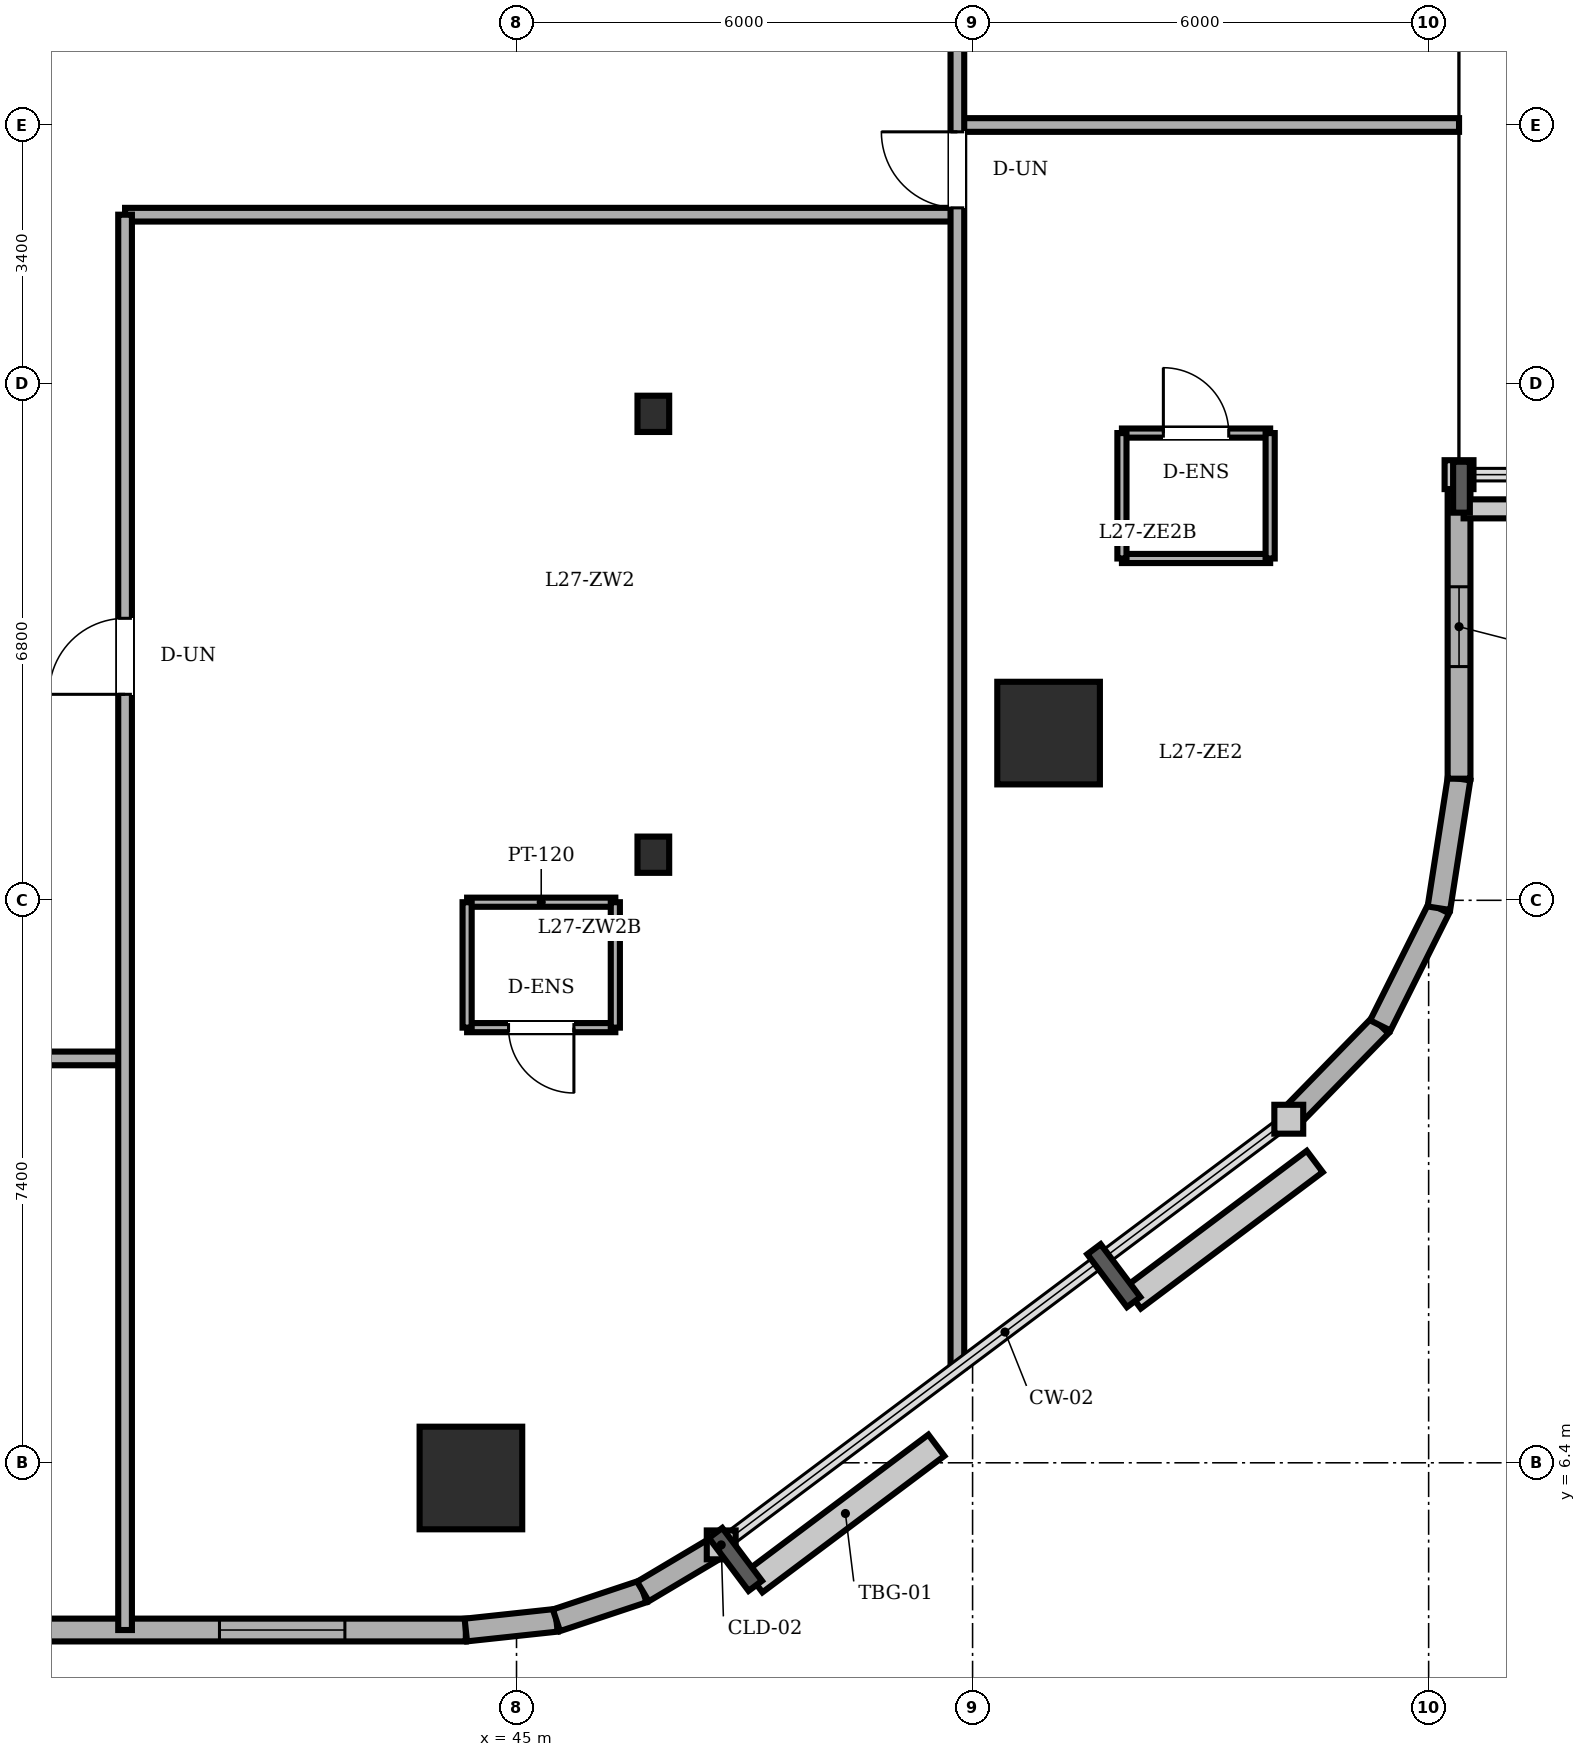
"""IFC4 building model, lengths in metres.
Left out: names, types, materials, properties, quantities, classifications, styles, units other than length and angle.
Written with IfcOpenShell. Run it as: python <this file> out.ifc"""

import sys

from ifc_helpers import new_model, si_unit, direction, frame, frame_2d, origin, origin_2d, place, context, subcontext, project, spatial, rectangle, circle, i_section, extrude, element, fill, save


model = new_model("IFC4")
c1 = context("Model", 3, precision=1e-05, world=origin(), true_north=direction((0.0, 1.0)))
c2 = subcontext(c1, "Body", "Model", "MODEL_VIEW")
j1 = project(units=[si_unit("LENGTHUNIT", "METRE"), si_unit("PLANEANGLEUNIT", "RADIAN")], contexts=[c1])
p1 = place(None, origin())
s1 = spatial("IfcSite", under=j1, at=p1, CompositionType="ELEMENT")
p2 = place(p1, origin())
s2 = spatial("IfcBuilding", under=s1, at=p2, CompositionType="ELEMENT")
p3 = place(p2, frame((0.0, 0.0, 104.3)))
s3 = spatial("IfcBuildingStorey", under=s2, at=p3, CompositionType="ELEMENT", Elevation=104.3)
for number, where, z_axis, x_axis in (
    (1, (44.4, 6.2, 0.0), (0.0, 0.0, 1.0), (1.0, 0.0, 0.0)),
    (2, (52.0, 16.0, 0.0), (0.0, 0.0, 1.0), (1.0, 0.0, 0.0)),
):
    element("IfcColumn", number, at=place(p3, frame(where, z_axis=z_axis, x_axis=x_axis)), inside=s3, PredefinedType="COLUMN", context=c2, shape_type="SweptSolid", body=[
        extrude(circle(Radius=0.675, at=origin_2d()), origin(), (0.0, 0.0, 1.0), 3.6),
    ])
for number, where, z_axis, x_axis in (
    (3, (46.8, 14.4, 0.0), (0.0, 0.0, 1.0), (1.0, 0.0, 0.0)),
    (4, (46.8, 20.2, 0.0), (0.0, 0.0, 1.0), (1.0, 0.0, 0.0)),
):
    element("IfcColumn", number, at=place(p3, frame(where, z_axis=z_axis, x_axis=x_axis)), inside=s3, PredefinedType="COLUMN", context=c2, shape_type="SweptSolid", body=[
        extrude(i_section(OverallWidth=0.417, OverallDepth=0.477, WebThickness=0.036, FlangeThickness=0.057, FilletRadius=0.015, at=origin_2d()), origin(), (0.0, 0.0, 1.0), 3.6),
    ])
p4 = place(p3, frame((14.4, 4.2, 0.0), z_axis=(0.0, 0.0, 1.0), x_axis=(1.0, 0.0, 0.0)))
e5 = element("IfcWall", 5, at=p4, inside=s3, PredefinedType="SOLIDWALL", context=c2, shape_type="SweptSolid", body=[
    extrude(rectangle(XDim=29.933, YDim=0.3, at=frame_2d((14.967, 0.0))), origin(), (0.0, 0.0, 1.0), 3.4),
])
p5 = place(p4, frame((13.525, 0.0, 0.0)))
e6 = element("IfcOpeningElement", 6, at=p5, cuts=e5, PredefinedType="OPENING", context=c2, shape_type="SweptSolid", body=[
    extrude(rectangle(XDim=0.95, YDim=2.2, at=frame_2d((0.475, 1.1))), frame((0.0, 0.16, 0.0), z_axis=(0.0, -1.0, 0.0), x_axis=(1.0, 0.0, 0.0)), (0.0, 0.0, 1.0), 0.32),
])
p6 = place(p4, frame((2.342, 0.0, 0.85)))
e7 = element("IfcOpeningElement", 7, at=p6, cuts=e5, PredefinedType="OPENING", context=c2, shape_type="SweptSolid", body=[
    extrude(rectangle(XDim=1.65, YDim=1.55, at=frame_2d((0.825, 0.775))), frame((0.0, 0.16, 0.0), z_axis=(0.0, -1.0, 0.0), x_axis=(1.0, 0.0, 0.0)), (0.0, 0.0, 1.0), 0.32),
])
p7 = place(p4, frame((5.158, 0.0, 0.85)))
e8 = element("IfcOpeningElement", 8, at=p7, cuts=e5, PredefinedType="OPENING", context=c2, shape_type="SweptSolid", body=[
    extrude(rectangle(XDim=1.65, YDim=1.55, at=frame_2d((0.825, 0.775))), frame((0.0, 0.16, 0.0), z_axis=(0.0, -1.0, 0.0), x_axis=(1.0, 0.0, 0.0)), (0.0, 0.0, 1.0), 0.32),
])
p8 = place(p4, frame((9.875, 0.0, 0.85)))
e9 = element("IfcOpeningElement", 9, at=p8, cuts=e5, PredefinedType="OPENING", context=c2, shape_type="SweptSolid", body=[
    extrude(rectangle(XDim=1.65, YDim=1.55, at=frame_2d((0.825, 0.775))), frame((0.0, 0.16, 0.0), z_axis=(0.0, -1.0, 0.0), x_axis=(1.0, 0.0, 0.0)), (0.0, 0.0, 1.0), 0.32),
])
p9 = place(p4, frame((16.058, 0.0, 0.85)))
e10 = element("IfcOpeningElement", 10, at=p9, cuts=e5, PredefinedType="OPENING", context=c2, shape_type="SweptSolid", body=[
    extrude(rectangle(XDim=1.65, YDim=1.55, at=frame_2d((0.825, 0.775))), frame((0.0, 0.16, 0.0), z_axis=(0.0, -1.0, 0.0), x_axis=(1.0, 0.0, 0.0)), (0.0, 0.0, 1.0), 0.32),
])
p10 = place(p4, frame((20.342, 0.0, 0.85)))
e11 = element("IfcOpeningElement", 11, at=p10, cuts=e5, PredefinedType="OPENING", context=c2, shape_type="SweptSolid", body=[
    extrude(rectangle(XDim=1.65, YDim=1.55, at=frame_2d((0.825, 0.775))), frame((0.0, 0.16, 0.0), z_axis=(0.0, -1.0, 0.0), x_axis=(1.0, 0.0, 0.0)), (0.0, 0.0, 1.0), 0.32),
])
p11 = place(p4, frame((26.692, 0.0, 0.85)))
e12 = element("IfcOpeningElement", 12, at=p11, cuts=e5, PredefinedType="OPENING", context=c2, shape_type="SweptSolid", body=[
    extrude(rectangle(XDim=1.65, YDim=1.55, at=frame_2d((0.825, 0.775))), frame((0.0, 0.16, 0.0), z_axis=(0.0, -1.0, 0.0), x_axis=(1.0, 0.0, 0.0)), (0.0, 0.0, 1.0), 0.32),
])
p12 = place(p3, frame((44.333, 4.2, 0.0), z_axis=(0.0, 0.0, 1.0), x_axis=(0.994289103787, 0.106720092254, 0.0)))
e13 = element("IfcWall", 13, at=p12, inside=s3, PredefinedType="SOLIDWALL", context=c2, shape_type="SweptSolid", body=[
    extrude(rectangle(XDim=1.199, YDim=0.3, at=frame_2d((0.599, 0.0))), origin(), (0.0, 0.0, 1.0), 3.4),
])
p13 = place(p3, frame((45.525, 4.328, 0.0), z_axis=(0.0, 0.0, 1.0), x_axis=(0.948744332129, 0.316044604847, 0.0)))
e14 = element("IfcWall", 14, at=p13, inside=s3, PredefinedType="SOLIDWALL", context=c2, shape_type="SweptSolid", body=[
    extrude(rectangle(XDim=1.2, YDim=0.3, at=frame_2d((0.6, 0.0))), origin(), (0.0, 0.0, 1.0), 3.4),
])
p14 = place(p3, frame((46.663, 4.707, 0.0), z_axis=(0.0, 0.0, 1.0), x_axis=(0.859320591642, 0.511437308749, 0.0)))
e15 = element("IfcWall", 15, at=p14, inside=s3, PredefinedType="SOLIDWALL", context=c2, shape_type="SweptSolid", body=[
    extrude(rectangle(XDim=1.199, YDim=0.3, at=frame_2d((0.599, 0.0))), origin(), (0.0, 0.0, 1.0), 3.4),
])
for number, where, z_axis, x_axis in (
    (16, (55.16, 10.92, 0.0), (0.0, 0.0, 1.0), (0.698, 0.716, 0.0)),
    (17, (56.364, 12.154, 0.0), (0.0, 0.0, 1.0), (0.447, 0.894, 0.0)),
):
    element("IfcWall", number, at=place(p3, frame(where, z_axis=z_axis, x_axis=x_axis)), inside=s3, PredefinedType="SOLIDWALL", context=c2, shape_type="SweptSolid", body=[
        extrude(rectangle(XDim=1.724, YDim=0.3, at=frame_2d((0.862, 0.0))), origin(), (0.0, 0.0, 1.0), 3.4),
    ])
p15 = place(p3, frame((57.135, 13.696, 0.0), z_axis=(0.0, 0.0, 1.0), x_axis=(0.153620989032, 0.988129845581, 0.0)))
e18 = element("IfcWall", 18, at=p15, inside=s3, PredefinedType="SOLIDWALL", context=c2, shape_type="SweptSolid", body=[
    extrude(rectangle(XDim=1.724, YDim=0.3, at=frame_2d((0.862, 0.0))), origin(), (0.0, 0.0, 1.0), 3.4),
])
p16 = place(p3, frame((57.4, 15.4, 0.0), z_axis=(0.0, 0.0, 1.0), x_axis=(0.0, 1.0, 0.0)))
e19 = element("IfcWall", 19, at=p16, inside=s3, PredefinedType="SOLIDWALL", context=c2, shape_type="SweptSolid", body=[
    extrude(rectangle(XDim=4.0, YDim=0.3, at=frame_2d((2.0, 0.0))), origin(), (0.0, 0.0, 1.0), 3.4),
])
p17 = place(p16, frame((1.475, 0.0, 0.85)))
e20 = element("IfcOpeningElement", 20, at=p17, cuts=e19, PredefinedType="OPENING", context=c2, shape_type="SweptSolid", body=[
    extrude(rectangle(XDim=1.05, YDim=1.55, at=frame_2d((0.525, 0.775))), frame((0.0, 0.16, 0.0), z_axis=(0.0, -1.0, 0.0), x_axis=(1.0, 0.0, 0.0)), (0.0, 0.0, 1.0), 0.32),
])
p18 = place(p3, frame((44.35, 13.775, 0.0), z_axis=(0.0, 0.0, 1.0), x_axis=(1.0, 0.0, 0.0)))
e21 = element("IfcWall", 21, at=p18, inside=s3, PredefinedType="PARTITIONING", context=c2, shape_type="SweptSolid", body=[
    extrude(rectangle(XDim=1.95, YDim=0.12, at=frame_2d((0.975, 0.0))), origin(), (0.0, 0.0, 1.0), 3.4),
])
p19 = place(p3, frame((46.3, 12.125, 0.0), z_axis=(0.0, 0.0, 1.0), x_axis=(-1.0, 0.0, 0.0)))
e22 = element("IfcWall", 22, at=p19, inside=s3, PredefinedType="PARTITIONING", context=c2, shape_type="SweptSolid", body=[
    extrude(rectangle(XDim=1.95, YDim=0.12, at=frame_2d((0.975, 0.0))), origin(), (0.0, 0.0, 1.0), 3.4),
])
p20 = place(p19, frame((0.545, 0.0, 0.0)))
e23 = element("IfcOpeningElement", 23, at=p20, cuts=e22, PredefinedType="OPENING", context=c2, shape_type="SweptSolid", body=[
    extrude(rectangle(XDim=0.86, YDim=2.1, at=frame_2d((0.43, 1.05))), frame((0.0, 0.07, 0.0), z_axis=(0.0, -1.0, 0.0), x_axis=(1.0, 0.0, 0.0)), (0.0, 0.0, 1.0), 0.14),
])
p21 = place(p3, frame((44.35, 13.775, 0.0), z_axis=(0.0, 0.0, 1.0), x_axis=(0.0, -1.0, 0.0)))
e24 = element("IfcWall", 24, at=p21, inside=s3, PredefinedType="PARTITIONING", context=c2, shape_type="SweptSolid", body=[
    extrude(rectangle(XDim=1.65, YDim=0.12, at=frame_2d((0.825, 0.0))), origin(), (0.0, 0.0, 1.0), 3.4),
])
p22 = place(p3, frame((46.3, 12.125, 0.0), z_axis=(0.0, 0.0, 1.0), x_axis=(0.0, 1.0, 0.0)))
e25 = element("IfcWall", 25, at=p22, inside=s3, PredefinedType="PARTITIONING", context=c2, shape_type="SweptSolid", body=[
    extrude(rectangle(XDim=1.65, YDim=0.12, at=frame_2d((0.825, 0.0))), origin(), (0.0, 0.0, 1.0), 2.882),
])
p23 = place(p3, frame((52.965, 19.947, 0.0), z_axis=(0.0, 0.0, 1.0), x_axis=(1.0, 0.0, 0.0)))
e26 = element("IfcWall", 26, at=p23, inside=s3, PredefinedType="PARTITIONING", context=c2, shape_type="SweptSolid", body=[
    extrude(rectangle(XDim=1.95, YDim=0.12, at=frame_2d((0.975, 0.0))), origin(), (0.0, 0.0, 1.0), 3.4),
])
p24 = place(p23, frame((0.545, 0.0, 0.0)))
e27 = element("IfcOpeningElement", 27, at=p24, cuts=e26, PredefinedType="OPENING", context=c2, shape_type="SweptSolid", body=[
    extrude(rectangle(XDim=0.86, YDim=2.1, at=frame_2d((0.43, 1.05))), frame((0.0, 0.07, 0.0), z_axis=(0.0, -1.0, 0.0), x_axis=(1.0, 0.0, 0.0)), (0.0, 0.0, 1.0), 0.14),
])
p25 = place(p3, frame((54.915, 18.297, 0.0), z_axis=(0.0, 0.0, 1.0), x_axis=(-1.0, 0.0, 0.0)))
e28 = element("IfcWall", 28, at=p25, inside=s3, PredefinedType="PARTITIONING", context=c2, shape_type="SweptSolid", body=[
    extrude(rectangle(XDim=1.95, YDim=0.12, at=frame_2d((0.975, 0.0))), origin(), (0.0, 0.0, 1.0), 3.4),
])
for number, where, z_axis, x_axis in (
    (29, (52.965, 19.947, 0.0), (0.0, 0.0, 1.0), (0.0, -1.0, 0.0)),
    (30, (54.915, 18.297, 0.0), (0.0, 0.0, 1.0), (0.0, 1.0, 0.0)),
):
    element("IfcWall", number, at=place(p3, frame(where, z_axis=z_axis, x_axis=x_axis)), inside=s3, PredefinedType="PARTITIONING", context=c2, shape_type="SweptSolid", body=[
        extrude(rectangle(XDim=1.65, YDim=0.12, at=frame_2d((0.825, 0.0))), origin(), (0.0, 0.0, 1.0), 3.4),
    ])
p26 = place(p3, frame((8.8, 11.72, 0.0), z_axis=(0.0, 0.0, 1.0), x_axis=(1.0, 0.0, 0.0)))
e31 = element("IfcWall", 31, at=p26, inside=s3, PredefinedType="PARTITIONING", context=c2, shape_type="SweptSolid", body=[
    extrude(rectangle(XDim=31.05, YDim=0.18, at=frame_2d((15.525, 0.0))), origin(), (0.0, 0.0, 1.0), 3.4),
])
p27 = place(p26, frame((15.84, 0.0, 0.0)))
e32 = element("IfcOpeningElement", 32, at=p27, cuts=e31, PredefinedType="OPENING", context=c2, shape_type="SweptSolid", body=[
    extrude(rectangle(XDim=0.92, YDim=2.1, at=frame_2d((0.46, 1.05))), frame((0.0, 0.1, 0.0), z_axis=(0.0, -1.0, 0.0), x_axis=(1.0, 0.0, 0.0)), (0.0, 0.0, 1.0), 0.2),
])
p28 = place(p26, frame((7.34, 0.0, 0.0)))
e33 = element("IfcOpeningElement", 33, at=p28, cuts=e31, PredefinedType="OPENING", context=c2, shape_type="SweptSolid", body=[
    extrude(rectangle(XDim=0.92, YDim=2.1, at=frame_2d((0.46, 1.05))), frame((0.0, 0.1, 0.0), z_axis=(0.0, -1.0, 0.0), x_axis=(1.0, 0.0, 0.0)), (0.0, 0.0, 1.0), 0.2),
])
p29 = place(p26, frame((23.905, 0.0, 0.0)))
e34 = element("IfcOpeningElement", 34, at=p29, cuts=e31, PredefinedType="OPENING", context=c2, shape_type="SweptSolid", body=[
    extrude(rectangle(XDim=0.92, YDim=2.1, at=frame_2d((0.46, 1.05))), frame((0.0, 0.1, 0.0), z_axis=(0.0, -1.0, 0.0), x_axis=(1.0, 0.0, 0.0)), (0.0, 0.0, 1.0), 0.2),
])
p30 = place(p3, frame((39.85, 22.82, 0.0), z_axis=(0.0, 0.0, 1.0), x_axis=(1.0, 0.0, 0.0)))
e35 = element("IfcWall", 35, at=p30, inside=s3, PredefinedType="PARTITIONING", context=c2, shape_type="SweptSolid", body=[
    extrude(rectangle(XDim=10.95, YDim=0.18, at=frame_2d((5.475, 0.0))), origin(), (0.0, 0.0, 1.0), 3.4),
])
p31 = place(p3, frame((50.8, 24.0, 0.0), z_axis=(0.0, 0.0, 1.0), x_axis=(1.0, 0.0, 0.0)))
e36 = element("IfcWall", 36, at=p31, inside=s3, PredefinedType="PARTITIONING", context=c2, shape_type="SweptSolid", body=[
    extrude(rectangle(XDim=6.6, YDim=0.18, at=frame_2d((3.3, 0.0))), origin(), (0.0, 0.0, 1.0), 3.022),
])
p32 = place(p3, frame((39.85, 4.2, 0.0), z_axis=(0.0, 0.0, 1.0), x_axis=(0.0, 1.0, 0.0)))
e37 = element("IfcWall", 37, at=p32, inside=s3, PredefinedType="PARTITIONING", context=c2, shape_type="SweptSolid", body=[
    extrude(rectangle(XDim=18.62, YDim=0.18, at=frame_2d((9.31, 0.0))), origin(), (0.0, 0.0, 1.0), 3.4),
])
p33 = place(p32, frame((12.31, 0.0, 0.0)))
e38 = element("IfcOpeningElement", 38, at=p33, cuts=e37, PredefinedType="OPENING", context=c2, shape_type="SweptSolid", body=[
    extrude(rectangle(XDim=1.0, YDim=2.15, at=frame_2d((0.5, 1.075))), frame((0.0, 0.1, 0.0), z_axis=(0.0, -1.0, 0.0), x_axis=(1.0, 0.0, 0.0)), (0.0, 0.0, 1.0), 0.2),
])
p34 = place(p3, frame((50.8, 7.65, 0.0), z_axis=(0.0, 0.0, 1.0), x_axis=(0.0, 1.0, 0.0)))
e39 = element("IfcWall", 39, at=p34, inside=s3, PredefinedType="PARTITIONING", context=c2, shape_type="SweptSolid", body=[
    extrude(rectangle(XDim=22.7, YDim=0.18, at=frame_2d((11.35, 0.0))), origin(), (0.0, 0.0, 1.0), 3.4),
])
p35 = place(p34, frame((18.765, 0.0, 0.0)))
e40 = element("IfcOpeningElement", 40, at=p35, cuts=e39, PredefinedType="OPENING", context=c2, shape_type="SweptSolid", body=[
    extrude(rectangle(XDim=1.0, YDim=2.15, at=frame_2d((0.5, 1.075))), frame((0.0, 0.1, 0.0), z_axis=(0.0, -1.0, 0.0), x_axis=(1.0, 0.0, 0.0)), (0.0, 0.0, 1.0), 0.2),
])
p36 = place(p34, frame((15.26, 0.0, 0.0)))
e41 = element("IfcOpeningElement", 41, at=p36, cuts=e39, PredefinedType="OPENING", context=c2, shape_type="SweptSolid", body=[
    extrude(rectangle(XDim=1.0, YDim=2.15, at=frame_2d((0.5, 1.075))), frame((0.0, 0.1, 0.0), z_axis=(0.0, -1.0, 0.0), x_axis=(1.0, 0.0, 0.0)), (0.0, 0.0, 1.0), 0.2),
])
p37 = place(p11, origin())
e42 = element("IfcWindow", 42, at=p37, inside=s3, PartitioningType="DOUBLE_PANEL_VERTICAL", PredefinedType="WINDOW", context=c2, shape_type="SweptSolid", body=[
    extrude(rectangle(XDim=1.65, YDim=1.55, at=frame_2d((0.825, 0.775))), frame((0.0, 0.03, 0.0), z_axis=(0.0, -1.0, 0.0), x_axis=(1.0, 0.0, 0.0)), (0.0, 0.0, 1.0), 0.06),
])
fill(e12, e42)
p38 = place(p17, origin())
e43 = element("IfcWindow", 43, at=p38, inside=s3, PartitioningType="SINGLE_PANEL", PredefinedType="WINDOW", context=c2, shape_type="SweptSolid", body=[
    extrude(rectangle(XDim=1.05, YDim=1.55, at=frame_2d((0.525, 0.775))), frame((0.0, 0.03, 0.0), z_axis=(0.0, -1.0, 0.0), x_axis=(1.0, 0.0, 0.0)), (0.0, 0.0, 1.0), 0.06),
])
fill(e20, e43)
p39 = place(p20, origin())
e44 = element("IfcDoor", 44, at=p39, inside=s3, OperationType="SINGLE_SWING_LEFT", PredefinedType="DOOR", context=c2, shape_type="SweptSolid", body=[
    extrude(rectangle(XDim=0.86, YDim=2.1, at=frame_2d((0.43, 1.05))), frame((0.0, 0.025, 0.0), z_axis=(0.0, -1.0, 0.0), x_axis=(1.0, 0.0, 0.0)), (0.0, 0.0, 1.0), 0.05),
])
fill(e23, e44)
p40 = place(p24, origin())
e45 = element("IfcDoor", 45, at=p40, inside=s3, OperationType="SINGLE_SWING_LEFT", PredefinedType="DOOR", context=c2, shape_type="SweptSolid", body=[
    extrude(rectangle(XDim=0.86, YDim=2.1, at=frame_2d((0.43, 1.05))), frame((0.0, 0.025, 0.0), z_axis=(0.0, -1.0, 0.0), x_axis=(1.0, 0.0, 0.0)), (0.0, 0.0, 1.0), 0.05),
])
fill(e27, e45)
p41 = place(p33, origin())
e46 = element("IfcDoor", 46, at=p41, inside=s3, OperationType="SINGLE_SWING_LEFT", PredefinedType="DOOR", context=c2, shape_type="SweptSolid", body=[
    extrude(rectangle(XDim=1.0, YDim=2.15, at=frame_2d((0.5, 1.075))), frame((0.0, 0.025, 0.0), z_axis=(0.0, -1.0, 0.0), x_axis=(1.0, 0.0, 0.0)), (0.0, 0.0, 1.0), 0.05),
])
fill(e38, e46)
p42 = place(p36, origin())
e47 = element("IfcDoor", 47, at=p42, inside=s3, OperationType="SINGLE_SWING_RIGHT", PredefinedType="DOOR", context=c2, shape_type="SweptSolid", body=[
    extrude(rectangle(XDim=1.0, YDim=2.15, at=frame_2d((0.5, 1.075))), frame((0.0, 0.025, 0.0), z_axis=(0.0, -1.0, 0.0), x_axis=(1.0, 0.0, 0.0)), (0.0, 0.0, 1.0), 0.05),
])
fill(e41, e47)
save(model, sys.argv[1])
